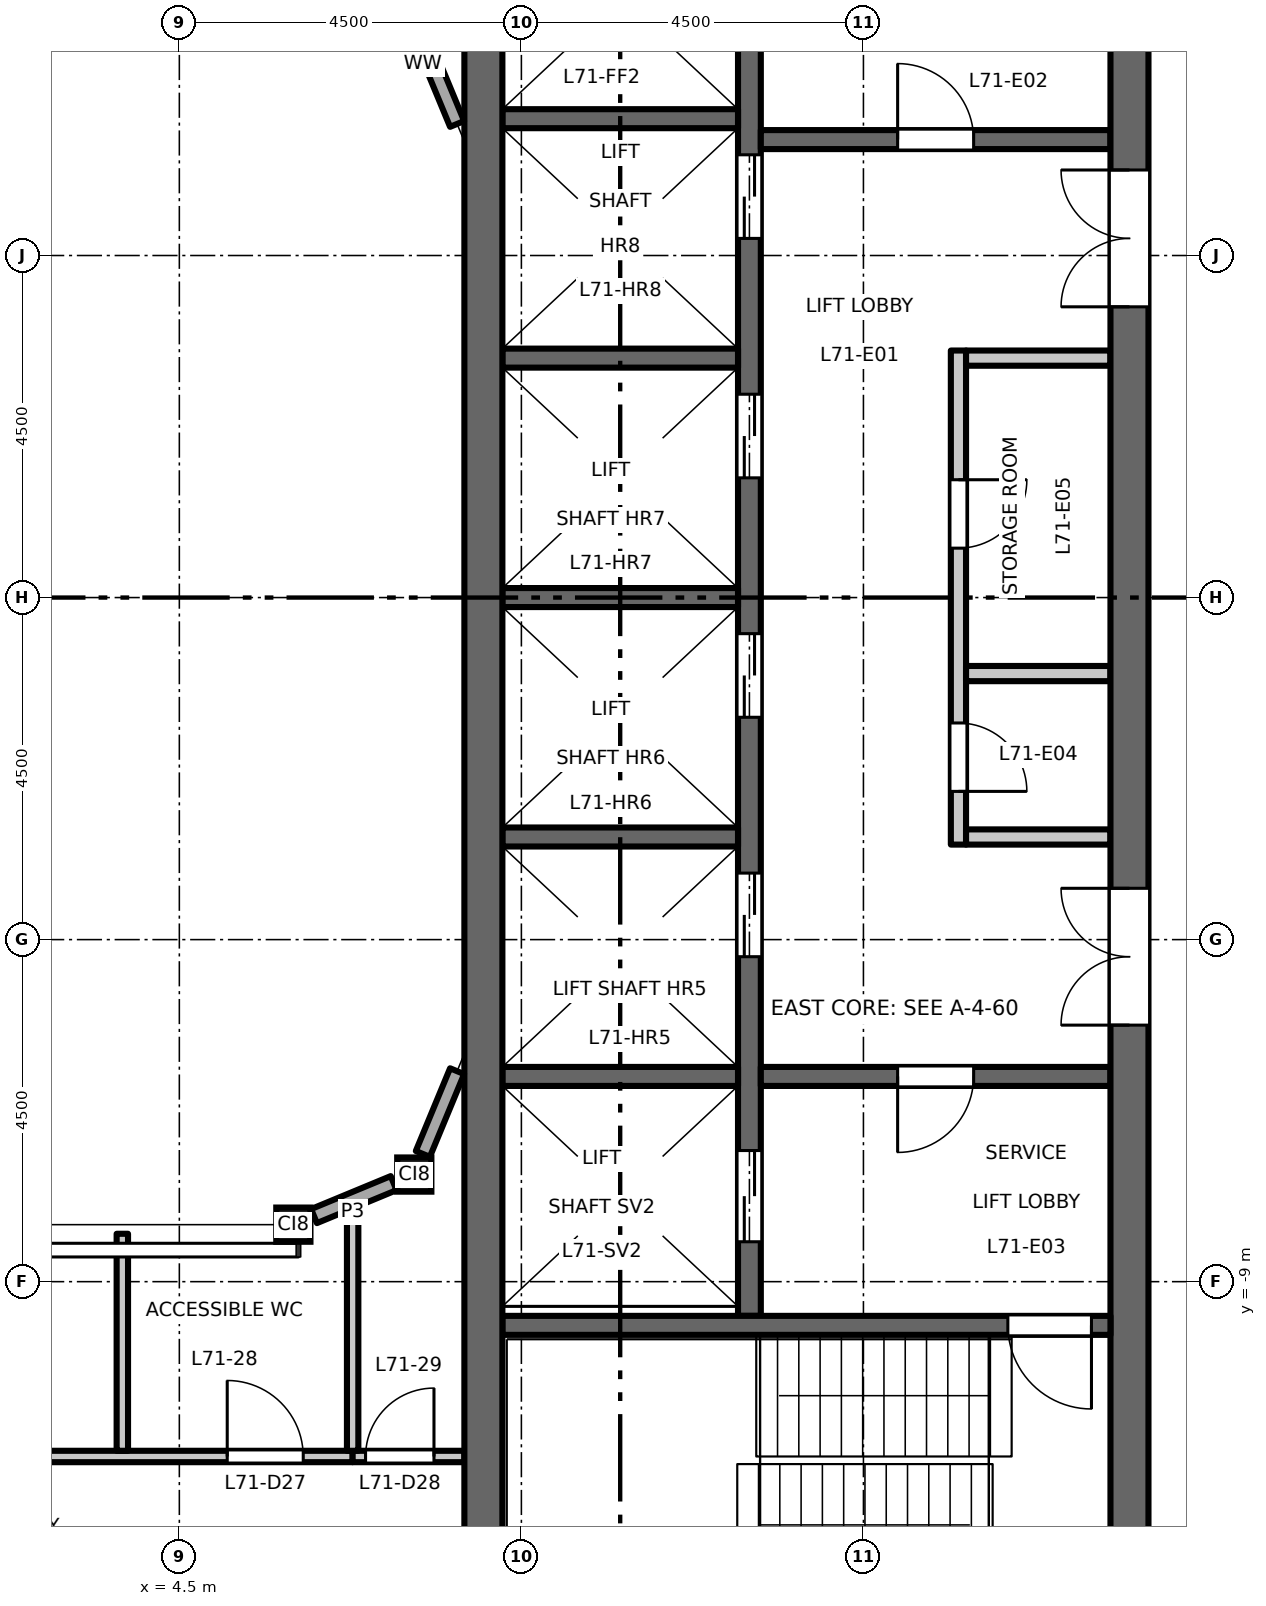
"""IFC4 building model, lengths in metres.
Left out: names, types, materials, properties, quantities, classifications, styles, units other than length and angle.
Written with IfcOpenShell. Run it as: python <this file> out.ifc"""

import sys

from ifc_helpers import new_model, si_unit, direction, frame, frame_2d, origin, origin_2d, place, context, subcontext, project, spatial, rectangle, hollow_rectangle, extrude, element, fill, save


model = new_model("IFC4")
c1 = context("Model", 3, precision=1e-05, world=origin(), true_north=direction((0.0, 1.0)))
c2 = subcontext(c1, "Body", "Model", "MODEL_VIEW")
j1 = project(units=[si_unit("LENGTHUNIT", "METRE"), si_unit("PLANEANGLEUNIT", "RADIAN")], contexts=[c1])
p1 = place(None, origin())
s1 = spatial("IfcSite", under=j1, at=p1, CompositionType="ELEMENT")
p2 = place(p1, origin())
s2 = spatial("IfcBuilding", under=s1, at=p2, CompositionType="ELEMENT")
p3 = place(p2, frame((0.0, 0.0, 330.2)))
s3 = spatial("IfcBuildingStorey", under=s2, at=p3, CompositionType="ELEMENT", Elevation=330.2)
for number, where, z_axis, x_axis in (
    (1, (6.0, -8.25, 0.0), (0.0, 0.0, 1.0), (1.0, 0.0, 0.0)),
    (2, (7.591, -7.591, 0.0), (0.0, 0.0, 1.0), (1.0, 0.0, 0.0)),
):
    element("IfcColumn", number, at=place(p3, frame(where, z_axis=z_axis, x_axis=x_axis)), inside=s3, PredefinedType="COLUMN", context=c2, shape_type="SweptSolid", body=[
        extrude(hollow_rectangle(XDim=0.45, YDim=0.45, WallThickness=0.022, at=origin_2d()), origin(), (0.0, 0.0, 1.0), 4.5),
    ])
p4 = place(p3, frame((14.75, -3.25, 0.0), z_axis=(0.0, 0.0, 1.0), x_axis=(0.0, 1.0, 0.0)))
e3 = element("IfcWall", 3, at=p4, inside=s3, PredefinedType="PARTITIONING", context=c2, shape_type="SweptSolid", body=[
    extrude(rectangle(XDim=6.5, YDim=0.2, at=frame_2d((3.25, 0.0))), origin(), (0.0, 0.0, 1.0), 4.35),
])
p5 = place(p4, frame((0.7, 0.0, 0.0)))
e4 = element("IfcOpeningElement", 4, at=p5, cuts=e3, PredefinedType="OPENING", context=c2, shape_type="SweptSolid", body=[
    extrude(rectangle(XDim=0.9, YDim=2.1, at=frame_2d((0.45, 1.05))), frame((0.0, 0.11, 0.0), z_axis=(0.0, -1.0, 0.0), x_axis=(1.0, 0.0, 0.0)), (0.0, 0.0, 1.0), 0.22),
])
p6 = place(p4, frame((3.9, 0.0, 0.0)))
e5 = element("IfcOpeningElement", 5, at=p6, cuts=e3, PredefinedType="OPENING", context=c2, shape_type="SweptSolid", body=[
    extrude(rectangle(XDim=0.9, YDim=2.1, at=frame_2d((0.45, 1.05))), frame((0.0, 0.11, 0.0), z_axis=(0.0, -1.0, 0.0), x_axis=(1.0, 0.0, 0.0)), (0.0, 0.0, 1.0), 0.22),
])
for number, where, z_axis, x_axis in (
    (6, (14.85, 3.15, 0.0), (0.0, 0.0, 1.0), (1.0, 0.0, 0.0)),
    (7, (14.85, -3.15, 0.0), (0.0, 0.0, 1.0), (1.0, 0.0, 0.0)),
    (8, (14.85, -1.0, 0.0), (0.0, 0.0, 1.0), (1.0, 0.0, 0.0)),
):
    element("IfcWall", number, at=place(p3, frame(where, z_axis=z_axis, x_axis=x_axis)), inside=s3, PredefinedType="PARTITIONING", context=c2, shape_type="SweptSolid", body=[
        extrude(rectangle(XDim=1.9, YDim=0.2, at=frame_2d((0.95, 0.0))), origin(), (0.0, 0.0, 1.0), 4.35),
    ])
p7 = place(p3, frame((12.0, -9.45, 0.0), z_axis=(0.0, 0.0, 1.0), x_axis=(0.0, 1.0, 0.0)))
e9 = element("IfcWall", 9, at=p7, inside=s3, PredefinedType="SHEAR", context=c2, shape_type="SweptSolid", body=[
    extrude(rectangle(XDim=18.9, YDim=0.3, at=frame_2d((9.45, 0.0))), origin(), (0.0, 0.0, 1.0), 4.35),
])
p8 = place(p7, frame((4.725, 0.0, 0.0)))
e10 = element("IfcOpeningElement", 10, at=p8, cuts=e9, PredefinedType="OPENING", context=c2, shape_type="SweptSolid", body=[
    extrude(rectangle(XDim=1.1, YDim=2.1, at=frame_2d((0.55, 1.05))), frame((0.0, 0.16, 0.0), z_axis=(0.0, -1.0, 0.0), x_axis=(1.0, 0.0, 0.0)), (0.0, 0.0, 1.0), 0.32),
])
p9 = place(p7, frame((7.875, 0.0, 0.0)))
e11 = element("IfcOpeningElement", 11, at=p9, cuts=e9, PredefinedType="OPENING", context=c2, shape_type="SweptSolid", body=[
    extrude(rectangle(XDim=1.1, YDim=2.1, at=frame_2d((0.55, 1.05))), frame((0.0, 0.16, 0.0), z_axis=(0.0, -1.0, 0.0), x_axis=(1.0, 0.0, 0.0)), (0.0, 0.0, 1.0), 0.32),
])
p10 = place(p7, frame((11.025, 0.0, 0.0)))
e12 = element("IfcOpeningElement", 12, at=p10, cuts=e9, PredefinedType="OPENING", context=c2, shape_type="SweptSolid", body=[
    extrude(rectangle(XDim=1.1, YDim=2.1, at=frame_2d((0.55, 1.05))), frame((0.0, 0.16, 0.0), z_axis=(0.0, -1.0, 0.0), x_axis=(1.0, 0.0, 0.0)), (0.0, 0.0, 1.0), 0.32),
])
p11 = place(p7, frame((14.175, 0.0, 0.0)))
e13 = element("IfcOpeningElement", 13, at=p11, cuts=e9, PredefinedType="OPENING", context=c2, shape_type="SweptSolid", body=[
    extrude(rectangle(XDim=1.1, YDim=2.1, at=frame_2d((0.55, 1.05))), frame((0.0, 0.16, 0.0), z_axis=(0.0, -1.0, 0.0), x_axis=(1.0, 0.0, 0.0)), (0.0, 0.0, 1.0), 0.32),
])
p12 = place(p7, frame((16.725, 0.0, 0.0)))
e14 = element("IfcOpeningElement", 14, at=p12, cuts=e9, PredefinedType="OPENING", context=c2, shape_type="SweptSolid", body=[
    extrude(rectangle(XDim=1.2, YDim=2.1, at=frame_2d((0.6, 1.05))), frame((0.0, 0.16, 0.0), z_axis=(0.0, -1.0, 0.0), x_axis=(1.0, 0.0, 0.0)), (0.0, 0.0, 1.0), 0.32),
])
p13 = place(p7, frame((0.975, 0.0, 0.0)))
e15 = element("IfcOpeningElement", 15, at=p13, cuts=e9, PredefinedType="OPENING", context=c2, shape_type="SweptSolid", body=[
    extrude(rectangle(XDim=1.2, YDim=2.1, at=frame_2d((0.6, 1.05))), frame((0.0, 0.16, 0.0), z_axis=(0.0, -1.0, 0.0), x_axis=(1.0, 0.0, 0.0)), (0.0, 0.0, 1.0), 0.32),
])
p14 = place(p3, frame((12.15, 6.025, 0.0), z_axis=(0.0, 0.0, 1.0), x_axis=(1.0, 0.0, 0.0)))
e16 = element("IfcWall", 16, at=p14, inside=s3, PredefinedType="SHEAR", context=c2, shape_type="SweptSolid", body=[
    extrude(rectangle(XDim=4.6, YDim=0.25, at=frame_2d((2.3, 0.0))), origin(), (0.0, 0.0, 1.0), 4.35),
])
p15 = place(p14, frame((1.8, 0.0, 0.0)))
e17 = element("IfcOpeningElement", 17, at=p15, cuts=e16, PredefinedType="OPENING", context=c2, shape_type="SweptSolid", body=[
    extrude(rectangle(XDim=1.0, YDim=2.1, at=frame_2d((0.5, 1.05))), frame((0.0, 0.135, 0.0), z_axis=(0.0, -1.0, 0.0), x_axis=(1.0, 0.0, 0.0)), (0.0, 0.0, 1.0), 0.27),
])
p16 = place(p3, frame((12.15, -6.3, 0.0), z_axis=(0.0, 0.0, 1.0), x_axis=(1.0, 0.0, 0.0)))
e18 = element("IfcWall", 18, at=p16, inside=s3, PredefinedType="SHEAR", context=c2, shape_type="SweptSolid", body=[
    extrude(rectangle(XDim=4.6, YDim=0.25, at=frame_2d((2.3, 0.0))), origin(), (0.0, 0.0, 1.0), 4.35),
])
p17 = place(p16, frame((1.8, 0.0, 0.0)))
e19 = element("IfcOpeningElement", 19, at=p17, cuts=e18, PredefinedType="OPENING", context=c2, shape_type="SweptSolid", body=[
    extrude(rectangle(XDim=1.0, YDim=2.1, at=frame_2d((0.5, 1.05))), frame((0.0, 0.135, 0.0), z_axis=(0.0, -1.0, 0.0), x_axis=(1.0, 0.0, 0.0)), (0.0, 0.0, 1.0), 0.27),
])
p18 = place(p3, frame((17.0, -13.0, 0.0), z_axis=(0.0, 0.0, 1.0), x_axis=(0.0, 1.0, 0.0)))
e20 = element("IfcWall", 20, at=p18, inside=s3, PredefinedType="SHEAR", context=c2, shape_type="SweptSolid", body=[
    extrude(rectangle(XDim=26.0, YDim=0.5, at=frame_2d((13.0, 0.0))), origin(), (0.0, 0.0, 1.0), 4.35),
])
p19 = place(p18, frame((16.825, 0.0, 0.0)))
e21 = element("IfcOpeningElement", 21, at=p19, cuts=e20, PredefinedType="OPENING", context=c2, shape_type="SweptSolid", body=[
    extrude(rectangle(XDim=1.8, YDim=2.1, at=frame_2d((0.9, 1.05))), frame((0.0, 0.26, 0.0), z_axis=(0.0, -1.0, 0.0), x_axis=(1.0, 0.0, 0.0)), (0.0, 0.0, 1.0), 0.52),
])
p20 = place(p18, frame((7.375, 0.0, 0.0)))
e22 = element("IfcOpeningElement", 22, at=p20, cuts=e20, PredefinedType="OPENING", context=c2, shape_type="SweptSolid", body=[
    extrude(rectangle(XDim=1.8, YDim=2.1, at=frame_2d((0.9, 1.05))), frame((0.0, 0.26, 0.0), z_axis=(0.0, -1.0, 0.0), x_axis=(1.0, 0.0, 0.0)), (0.0, 0.0, 1.0), 0.52),
])
for number, where, z_axis, x_axis in (
    (23, (8.75, 0.0, 0.0), (0.0, 0.0, 1.0), (1.0, 0.0, 0.0)),
    (24, (8.75, 3.15, 0.0), (0.0, 0.0, 1.0), (1.0, 0.0, 0.0)),
    (25, (8.75, 6.3, 0.0), (0.0, 0.0, 1.0), (1.0, 0.0, 0.0)),
    (26, (8.75, -3.15, 0.0), (0.0, 0.0, 1.0), (1.0, 0.0, 0.0)),
    (27, (8.75, -6.3, 0.0), (0.0, 0.0, 1.0), (1.0, 0.0, 0.0)),
):
    element("IfcWall", number, at=place(p3, frame(where, z_axis=z_axis, x_axis=x_axis)), inside=s3, PredefinedType="SHEAR", context=c2, shape_type="SweptSolid", body=[
        extrude(rectangle(XDim=3.1, YDim=0.25, at=frame_2d((1.55, 0.0))), origin(), (0.0, 0.0, 1.0), 4.35),
    ])
p21 = place(p3, frame((8.75, -9.575, 0.0), z_axis=(0.0, 0.0, 1.0), x_axis=(1.0, 0.0, 0.0)))
e28 = element("IfcWall", 28, at=p21, inside=s3, PredefinedType="SHEAR", context=c2, shape_type="SweptSolid", body=[
    extrude(rectangle(XDim=8.0, YDim=0.25, at=frame_2d((4.0, 0.0))), origin(), (0.0, 0.0, 1.0), 4.35),
])
p22 = place(p21, frame((6.65, 0.0, 0.0)))
e29 = element("IfcOpeningElement", 29, at=p22, cuts=e28, PredefinedType="OPENING", context=c2, shape_type="SweptSolid", body=[
    extrude(rectangle(XDim=1.1, YDim=2.1, at=frame_2d((0.55, 1.05))), frame((0.0, 0.135, 0.0), z_axis=(0.0, -1.0, 0.0), x_axis=(1.0, 0.0, 0.0)), (0.0, 0.0, 1.0), 0.27),
])
p23 = place(p3, frame((8.5, -13.0, 0.0), z_axis=(0.0, 0.0, 1.0), x_axis=(0.0, 1.0, 0.0)))
e30 = element("IfcWall", 30, at=p23, inside=s3, PredefinedType="SHEAR", context=c2, shape_type="SweptSolid", body=[
    extrude(rectangle(XDim=26.0, YDim=0.5, at=frame_2d((13.0, 0.0))), origin(), (0.0, 0.0, 1.0), 4.35),
])
p24 = place(p3, frame((6.271, -8.137, 0.0), z_axis=(0.0, 0.0, 1.0), x_axis=(0.923864661962, 0.382719331074, 0.0)))
e31 = element("IfcWall", 31, at=p24, inside=s3, PredefinedType="STANDARD", context=c2, shape_type="SweptSolid", body=[
    extrude(rectangle(XDim=1.134, YDim=0.2, at=frame_2d((0.567, 0.0))), origin(), (0.0, 0.0, 1.0), 4.01),
])
for number, where, z_axis, x_axis in (
    (32, (7.703, -7.319, 0.0), (0.0, 0.0, 1.0), (0.383, 0.924, 0.0)),
    (33, (8.154, 6.231, 0.0), (0.0, 0.0, 1.0), (-0.383, 0.924, 0.0)),
):
    element("IfcWall", number, at=place(p3, frame(where, z_axis=z_axis, x_axis=x_axis)), inside=s3, PredefinedType="STANDARD", context=c2, shape_type="SweptSolid", body=[
        extrude(rectangle(XDim=1.178, YDim=0.2, at=frame_2d((0.589, 0.0))), origin(), (0.0, 0.0, 1.0), 4.01),
    ])
p25 = place(p3, frame((-8.25, -11.3, 0.0), z_axis=(0.0, 0.0, 1.0), x_axis=(1.0, 0.0, 0.0)))
e34 = element("IfcWall", 34, at=p25, inside=s3, PredefinedType="PARTITIONING", context=c2, shape_type="SweptSolid", body=[
    extrude(rectangle(XDim=15.03, YDim=0.15, at=frame_2d((7.515, 0.0))), origin(), (0.0, 0.0, 1.0), 4.35),
])
p26 = place(p25, frame((4.35, 0.0, 0.0)))
e35 = element("IfcOpeningElement", 35, at=p26, cuts=e34, PredefinedType="OPENING", context=c2, shape_type="SweptSolid", body=[
    extrude(rectangle(XDim=1.0, YDim=2.1, at=frame_2d((0.5, 1.05))), frame((0.0, 0.085, 0.0), z_axis=(0.0, -1.0, 0.0), x_axis=(1.0, 0.0, 0.0)), (0.0, 0.0, 1.0), 0.17),
])
p27 = place(p25, frame((6.6, 0.0, 0.0)))
e36 = element("IfcOpeningElement", 36, at=p27, cuts=e34, PredefinedType="OPENING", context=c2, shape_type="SweptSolid", body=[
    extrude(rectangle(XDim=1.0, YDim=2.1, at=frame_2d((0.5, 1.05))), frame((0.0, 0.085, 0.0), z_axis=(0.0, -1.0, 0.0), x_axis=(1.0, 0.0, 0.0)), (0.0, 0.0, 1.0), 0.17),
])
p28 = place(p25, frame((13.38, 0.0, 0.0)))
e37 = element("IfcOpeningElement", 37, at=p28, cuts=e34, PredefinedType="OPENING", context=c2, shape_type="SweptSolid", body=[
    extrude(rectangle(XDim=1.0, YDim=2.1, at=frame_2d((0.5, 1.05))), frame((0.0, 0.085, 0.0), z_axis=(0.0, -1.0, 0.0), x_axis=(1.0, 0.0, 0.0)), (0.0, 0.0, 1.0), 0.17),
])
p29 = place(p3, frame((6.78, -11.3, 0.0), z_axis=(0.0, 0.0, 1.0), x_axis=(1.0, 0.0, 0.0)))
e38 = element("IfcWall", 38, at=p29, inside=s3, PredefinedType="PARTITIONING", context=c2, shape_type="SweptSolid", body=[
    extrude(rectangle(XDim=1.47, YDim=0.15, at=frame_2d((0.735, 0.0))), origin(), (0.0, 0.0, 1.0), 4.35),
])
p30 = place(p29, frame((0.17, 0.0, 0.0)))
e39 = element("IfcOpeningElement", 39, at=p30, cuts=e38, PredefinedType="OPENING", context=c2, shape_type="SweptSolid", body=[
    extrude(rectangle(XDim=0.9, YDim=2.1, at=frame_2d((0.45, 1.05))), frame((0.0, 0.085, 0.0), z_axis=(0.0, -1.0, 0.0), x_axis=(1.0, 0.0, 0.0)), (0.0, 0.0, 1.0), 0.17),
])
p31 = place(p3, frame((3.75, -11.225, 0.0), z_axis=(0.0, 0.0, 1.0), x_axis=(0.0, 1.0, 0.0)))
e40 = element("IfcWall", 40, at=p31, inside=s3, PredefinedType="PARTITIONING", context=c2, shape_type="SweptSolid", body=[
    extrude(rectangle(XDim=2.855, YDim=0.15, at=frame_2d((1.427, 0.0))), origin(), (0.0, 0.0, 1.0), 4.35),
])
p32 = place(p3, frame((6.78, -11.225, 0.0), z_axis=(0.0, 0.0, 1.0), x_axis=(0.0, 1.0, 0.0)))
e41 = element("IfcWall", 41, at=p32, inside=s3, PredefinedType="PARTITIONING", context=c2, shape_type="SweptSolid", body=[
    extrude(rectangle(XDim=3.138, YDim=0.15, at=frame_2d((1.569, 0.0))), origin(), (0.0, 0.0, 1.0), 4.35),
])
p33 = place(p15, origin())
e42 = element("IfcDoor", 42, at=p33, inside=s3, OperationType="SINGLE_SWING_RIGHT", PredefinedType="DOOR", context=c2, shape_type="SweptSolid", body=[
    extrude(rectangle(XDim=1.0, YDim=2.1, at=frame_2d((0.5, 1.05))), frame((0.0, 0.025, 0.0), z_axis=(0.0, -1.0, 0.0), x_axis=(1.0, 0.0, 0.0)), (0.0, 0.0, 1.0), 0.05),
])
fill(e17, e42)
p34 = place(p17, origin())
e43 = element("IfcDoor", 43, at=p34, inside=s3, OperationType="SINGLE_SWING_LEFT", PredefinedType="DOOR", context=c2, shape_type="SweptSolid", body=[
    extrude(rectangle(XDim=1.0, YDim=2.1, at=frame_2d((0.5, 1.05))), frame((0.0, 0.025, 0.0), z_axis=(0.0, -1.0, 0.0), x_axis=(1.0, 0.0, 0.0)), (0.0, 0.0, 1.0), 0.05),
])
fill(e19, e43)
p35 = place(p22, origin())
e44 = element("IfcDoor", 44, at=p35, inside=s3, OperationType="SINGLE_SWING_RIGHT", PredefinedType="DOOR", context=c2, shape_type="SweptSolid", body=[
    extrude(rectangle(XDim=1.1, YDim=2.1, at=frame_2d((0.55, 1.05))), frame((0.0, 0.025, 0.0), z_axis=(0.0, -1.0, 0.0), x_axis=(1.0, 0.0, 0.0)), (0.0, 0.0, 1.0), 0.05),
])
fill(e29, e44)
p36 = place(p19, origin())
e45 = element("IfcDoor", 45, at=p36, inside=s3, OperationType="DOUBLE_DOOR_DOUBLE_SWING", PredefinedType="DOOR", context=c2, shape_type="SweptSolid", body=[
    extrude(rectangle(XDim=1.8, YDim=2.1, at=frame_2d((0.9, 1.05))), frame((0.0, 0.025, 0.0), z_axis=(0.0, -1.0, 0.0), x_axis=(1.0, 0.0, 0.0)), (0.0, 0.0, 1.0), 0.05),
])
fill(e21, e45)
p37 = place(p20, origin())
e46 = element("IfcDoor", 46, at=p37, inside=s3, OperationType="DOUBLE_DOOR_DOUBLE_SWING", PredefinedType="DOOR", context=c2, shape_type="SweptSolid", body=[
    extrude(rectangle(XDim=1.8, YDim=2.1, at=frame_2d((0.9, 1.05))), frame((0.0, 0.025, 0.0), z_axis=(0.0, -1.0, 0.0), x_axis=(1.0, 0.0, 0.0)), (0.0, 0.0, 1.0), 0.05),
])
fill(e22, e46)
p38 = place(p8, origin())
e47 = element("IfcDoor", 47, at=p38, inside=s3, OperationType="DOUBLE_DOOR_SLIDING", PredefinedType="DOOR", context=c2, shape_type="SweptSolid", body=[
    extrude(rectangle(XDim=1.1, YDim=2.1, at=frame_2d((0.55, 1.05))), frame((0.0, 0.025, 0.0), z_axis=(0.0, -1.0, 0.0), x_axis=(1.0, 0.0, 0.0)), (0.0, 0.0, 1.0), 0.05),
])
fill(e10, e47)
p39 = place(p9, origin())
e48 = element("IfcDoor", 48, at=p39, inside=s3, OperationType="DOUBLE_DOOR_SLIDING", PredefinedType="DOOR", context=c2, shape_type="SweptSolid", body=[
    extrude(rectangle(XDim=1.1, YDim=2.1, at=frame_2d((0.55, 1.05))), frame((0.0, 0.025, 0.0), z_axis=(0.0, -1.0, 0.0), x_axis=(1.0, 0.0, 0.0)), (0.0, 0.0, 1.0), 0.05),
])
fill(e11, e48)
p40 = place(p10, origin())
e49 = element("IfcDoor", 49, at=p40, inside=s3, OperationType="DOUBLE_DOOR_SLIDING", PredefinedType="DOOR", context=c2, shape_type="SweptSolid", body=[
    extrude(rectangle(XDim=1.1, YDim=2.1, at=frame_2d((0.55, 1.05))), frame((0.0, 0.025, 0.0), z_axis=(0.0, -1.0, 0.0), x_axis=(1.0, 0.0, 0.0)), (0.0, 0.0, 1.0), 0.05),
])
fill(e12, e49)
p41 = place(p11, origin())
e50 = element("IfcDoor", 50, at=p41, inside=s3, OperationType="DOUBLE_DOOR_SLIDING", PredefinedType="DOOR", context=c2, shape_type="SweptSolid", body=[
    extrude(rectangle(XDim=1.1, YDim=2.1, at=frame_2d((0.55, 1.05))), frame((0.0, 0.025, 0.0), z_axis=(0.0, -1.0, 0.0), x_axis=(1.0, 0.0, 0.0)), (0.0, 0.0, 1.0), 0.05),
])
fill(e13, e50)
p42 = place(p13, origin())
e51 = element("IfcDoor", 51, at=p42, inside=s3, OperationType="DOUBLE_DOOR_SLIDING", PredefinedType="DOOR", context=c2, shape_type="SweptSolid", body=[
    extrude(rectangle(XDim=1.2, YDim=2.1, at=frame_2d((0.6, 1.05))), frame((0.0, 0.025, 0.0), z_axis=(0.0, -1.0, 0.0), x_axis=(1.0, 0.0, 0.0)), (0.0, 0.0, 1.0), 0.05),
])
fill(e15, e51)
p43 = place(p5, origin())
e52 = element("IfcDoor", 52, at=p43, inside=s3, OperationType="SINGLE_SWING_LEFT", PredefinedType="DOOR", context=c2, shape_type="SweptSolid", body=[
    extrude(rectangle(XDim=0.9, YDim=2.1, at=frame_2d((0.45, 1.05))), frame((0.0, 0.025, 0.0), z_axis=(0.0, -1.0, 0.0), x_axis=(1.0, 0.0, 0.0)), (0.0, 0.0, 1.0), 0.05),
])
fill(e4, e52)
p44 = place(p6, origin())
e53 = element("IfcDoor", 53, at=p44, inside=s3, OperationType="SINGLE_SWING_RIGHT", PredefinedType="DOOR", context=c2, shape_type="SweptSolid", body=[
    extrude(rectangle(XDim=0.9, YDim=2.1, at=frame_2d((0.45, 1.05))), frame((0.0, 0.025, 0.0), z_axis=(0.0, -1.0, 0.0), x_axis=(1.0, 0.0, 0.0)), (0.0, 0.0, 1.0), 0.05),
])
fill(e5, e53)
p45 = place(p28, origin())
e54 = element("IfcDoor", 54, at=p45, inside=s3, OperationType="SINGLE_SWING_LEFT", PredefinedType="DOOR", context=c2, shape_type="SweptSolid", body=[
    extrude(rectangle(XDim=1.0, YDim=2.1, at=frame_2d((0.5, 1.05))), frame((0.0, 0.025, 0.0), z_axis=(0.0, -1.0, 0.0), x_axis=(1.0, 0.0, 0.0)), (0.0, 0.0, 1.0), 0.05),
])
fill(e37, e54)
p46 = place(p30, origin())
e55 = element("IfcDoor", 55, at=p46, inside=s3, OperationType="SINGLE_SWING_RIGHT", PredefinedType="DOOR", context=c2, shape_type="SweptSolid", body=[
    extrude(rectangle(XDim=0.9, YDim=2.1, at=frame_2d((0.45, 1.05))), frame((0.0, 0.025, 0.0), z_axis=(0.0, -1.0, 0.0), x_axis=(1.0, 0.0, 0.0)), (0.0, 0.0, 1.0), 0.05),
])
fill(e39, e55)
save(model, sys.argv[1])
